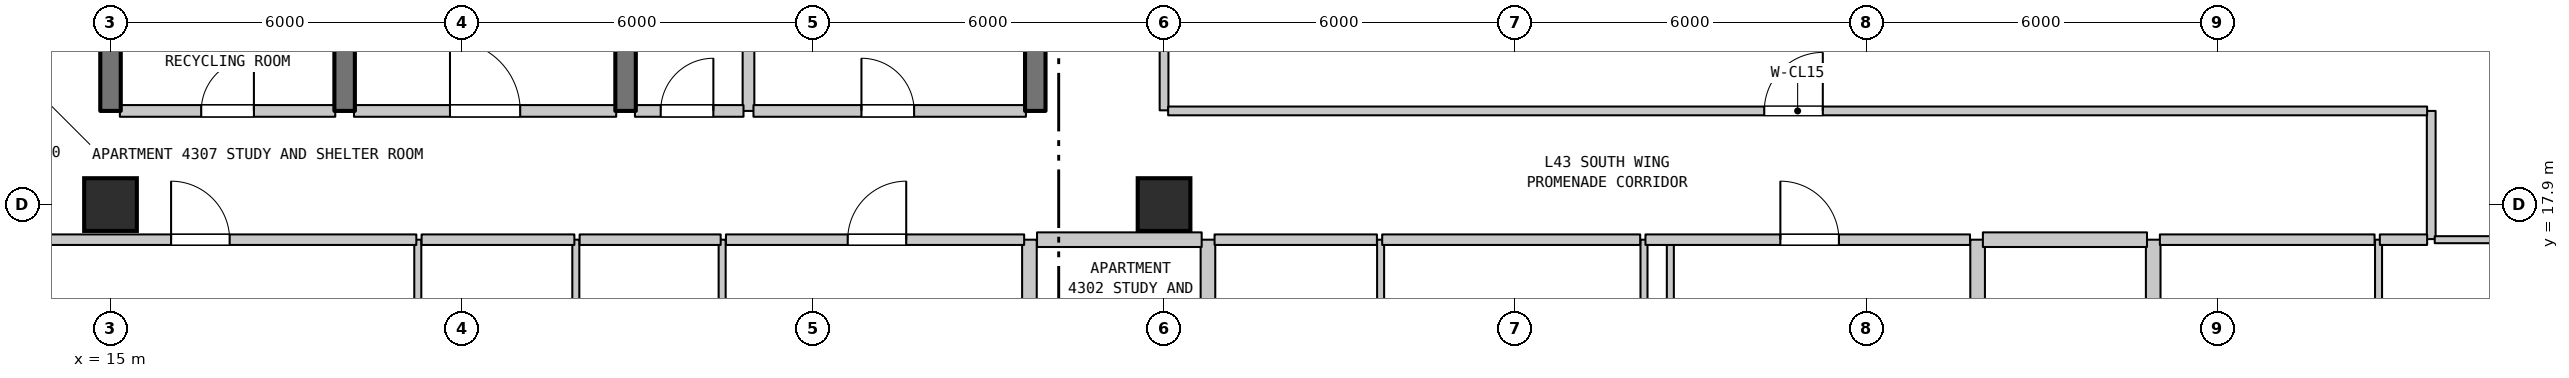
"""IFC4 building model, lengths in metres.
Left out: names, types, materials, properties, quantities, classifications, styles, units other than length and angle.
Written with IfcOpenShell. Run it as: python <this file> out.ifc"""

import sys

from ifc_helpers import new_model, si_unit, direction, frame, frame_2d, origin, origin_2d, place, context, subcontext, project, spatial, rectangle, extrude, element, fill, save


model = new_model("IFC4")
c1 = context("Model", 3, precision=1e-05, world=origin(), true_north=direction((0.0, 1.0)))
c2 = subcontext(c1, "Body", "Model", "MODEL_VIEW")
j1 = project(units=[si_unit("LENGTHUNIT", "METRE"), si_unit("PLANEANGLEUNIT", "RADIAN")], contexts=[c1])
p1 = place(None, origin())
s1 = spatial("IfcSite", under=j1, at=p1, CompositionType="ELEMENT")
p2 = place(p1, origin())
s2 = spatial("IfcBuilding", under=s1, at=p2, CompositionType="ELEMENT")
p3 = place(p2, frame((0.0, 0.0, 176.5)))
s3 = spatial("IfcBuildingStorey", under=s2, at=p3, CompositionType="ELEMENT", Elevation=176.5)
for number, where, z_axis, x_axis in (
    (1, (15.0, 17.9, 0.0), (0.0, 0.0, 1.0), (1.0, 0.0, 0.0)),
    (2, (33.0, 17.9, 0.0), (0.0, 0.0, 1.0), (1.0, 0.0, 0.0)),
):
    element("IfcColumn", number, at=place(p3, frame(where, z_axis=z_axis, x_axis=x_axis)), inside=s3, PredefinedType="COLUMN", context=c2, shape_type="SweptSolid", body=[
        extrude(rectangle(XDim=0.9, YDim=0.9, at=origin_2d()), origin(), (0.0, 0.0, 1.0), 3.7),
    ])
for number, where, z_axis, x_axis in (
    (3, (15.0, 19.5, 0.0), (0.0, 0.0, 1.0), (0.0, 1.0, 0.0)),
    (4, (19.0, 19.5, 0.0), (0.0, 0.0, 1.0), (0.0, 1.0, 0.0)),
):
    element("IfcWall", number, at=place(p3, frame(where, z_axis=z_axis, x_axis=x_axis)), inside=s3, PredefinedType="SHEAR", context=c2, shape_type="SweptSolid", body=[
        extrude(rectangle(XDim=3.2, YDim=0.35, at=frame_2d((1.6, 0.0))), origin(), (0.0, 0.0, 1.0), 3.39),
    ])
p4 = place(p3, frame((20.25, 14.1, 0.0), z_axis=(0.0, 0.0, 1.0), x_axis=(0.0, 1.0, 0.0)))
e5 = element("IfcWall", 5, at=p4, inside=s3, PredefinedType="PARTITIONING", context=c2, shape_type="SweptSolid", body=[
    extrude(rectangle(XDim=3.2, YDim=0.12, at=frame_2d((1.6, 0.0))), origin(), (0.0, 0.0, 1.0), 3.39),
])
p5 = place(p4, frame((1.15, 0.0, 0.0)))
e6 = element("IfcOpeningElement", 6, at=p5, cuts=e5, PredefinedType="OPENING", context=c2, shape_type="SweptSolid", body=[
    extrude(rectangle(XDim=0.9, YDim=2.15, at=frame_2d((0.45, 1.075))), frame((0.0, 0.07, 0.0), z_axis=(0.0, -1.0, 0.0), x_axis=(1.0, 0.0, 0.0)), (0.0, 0.0, 1.0), 0.14),
])
p6 = place(p3, frame((22.95, 14.1, 0.0), z_axis=(0.0, 0.0, 1.0), x_axis=(0.0, 1.0, 0.0)))
e7 = element("IfcWall", 7, at=p6, inside=s3, PredefinedType="PARTITIONING", context=c2, shape_type="SweptSolid", body=[
    extrude(rectangle(XDim=3.2, YDim=0.12, at=frame_2d((1.6, 0.0))), origin(), (0.0, 0.0, 1.0), 3.39),
])
p7 = place(p3, frame((23.8, 19.5, 0.0), z_axis=(0.0, 0.0, 1.0), x_axis=(0.0, 1.0, 0.0)))
e8 = element("IfcWall", 8, at=p7, inside=s3, PredefinedType="SHEAR", context=c2, shape_type="SweptSolid", body=[
    extrude(rectangle(XDim=3.2, YDim=0.35, at=frame_2d((1.6, 0.0))), origin(), (0.0, 0.0, 1.0), 3.39),
])
p8 = place(p3, frame((25.45, 14.85, 0.0), z_axis=(0.0, 0.0, 1.0), x_axis=(0.0, 1.0, 0.0)))
e9 = element("IfcWall", 9, at=p8, inside=s3, PredefinedType="PARTITIONING", context=c2, shape_type="SweptSolid", body=[
    extrude(rectangle(XDim=2.45, YDim=0.12, at=frame_2d((1.225, 0.0))), origin(), (0.0, 0.0, 1.0), 3.39),
])
p9 = place(p3, frame((25.9, 19.5, 0.0), z_axis=(0.0, 0.0, 1.0), x_axis=(0.0, 1.0, 0.0)))
e10 = element("IfcWall", 10, at=p9, inside=s3, PredefinedType="STANDARD", context=c2, shape_type="SweptSolid", body=[
    extrude(rectangle(XDim=3.2, YDim=0.2, at=frame_2d((1.6, 0.0))), origin(), (0.0, 0.0, 1.0), 3.39),
])
p10 = place(p3, frame((30.7, 11.15, 0.0), z_axis=(0.0, 0.0, 1.0), x_axis=(0.0, 1.0, 0.0)))
e11 = element("IfcWall", 11, at=p10, inside=s3, PredefinedType="STANDARD", context=c2, shape_type="SweptSolid", body=[
    extrude(rectangle(XDim=6.15, YDim=0.25, at=frame_2d((3.075, 0.0))), origin(), (0.0, 0.0, 1.0), 3.39),
])
p11 = place(p3, frame((30.8, 19.5, 0.0), z_axis=(0.0, 0.0, 1.0), x_axis=(0.0, 1.0, 0.0)))
e12 = element("IfcWall", 12, at=p11, inside=s3, PredefinedType="SHEAR", context=c2, shape_type="SweptSolid", body=[
    extrude(rectangle(XDim=3.2, YDim=0.35, at=frame_2d((1.6, 0.0))), origin(), (0.0, 0.0, 1.0), 3.39),
])
p12 = place(p3, frame((33.0, 19.51, 0.0), z_axis=(0.0, 0.0, 1.0), x_axis=(0.0, 1.0, 0.0)))
e13 = element("IfcWall", 13, at=p12, inside=s3, PredefinedType="STANDARD", context=c2, shape_type="SweptSolid", body=[
    extrude(rectangle(XDim=8.39, YDim=0.15, at=frame_2d((4.195, 0.0))), origin(), (0.0, 0.0, 1.0), 2.99),
])
p13 = place(p3, frame((33.75, 11.15, 0.0), z_axis=(0.0, 0.0, 1.0), x_axis=(0.0, 1.0, 0.0)))
e14 = element("IfcWall", 14, at=p13, inside=s3, PredefinedType="STANDARD", context=c2, shape_type="SweptSolid", body=[
    extrude(rectangle(XDim=6.15, YDim=0.25, at=frame_2d((3.075, 0.0))), origin(), (0.0, 0.0, 1.0), 3.39),
])
for number, where, z_axis, x_axis in (
    (15, (36.7, 11.15, 0.0), (0.0, 0.0, 1.0), (0.0, 1.0, 0.0)),
    (16, (41.2, 11.15, 0.0), (0.0, 0.0, 1.0), (0.0, 1.0, 0.0)),
):
    element("IfcWall", number, at=place(p3, frame(where, z_axis=z_axis, x_axis=x_axis)), inside=s3, PredefinedType="PARTITIONING", context=c2, shape_type="SweptSolid", body=[
        extrude(rectangle(XDim=6.15, YDim=0.12, at=frame_2d((3.075, 0.0))), origin(), (0.0, 0.0, 1.0), 3.39),
    ])
p14 = place(p3, frame((41.65, 14.85, 0.0), z_axis=(0.0, 0.0, 1.0), x_axis=(0.0, 1.0, 0.0)))
e17 = element("IfcWall", 17, at=p14, inside=s3, PredefinedType="PARTITIONING", context=c2, shape_type="SweptSolid", body=[
    extrude(rectangle(XDim=2.45, YDim=0.12, at=frame_2d((1.225, 0.0))), origin(), (0.0, 0.0, 1.0), 3.39),
])
for number, where, z_axis, x_axis in (
    (18, (46.9, 11.15, 0.0), (0.0, 0.0, 1.0), (0.0, 1.0, 0.0)),
    (19, (49.9, 11.15, 0.0), (0.0, 0.0, 1.0), (0.0, 1.0, 0.0)),
):
    element("IfcWall", number, at=place(p3, frame(where, z_axis=z_axis, x_axis=x_axis)), inside=s3, PredefinedType="STANDARD", context=c2, shape_type="SweptSolid", body=[
        extrude(rectangle(XDim=6.15, YDim=0.25, at=frame_2d((3.075, 0.0))), origin(), (0.0, 0.0, 1.0), 3.39),
    ])
p15 = place(p3, frame((53.75, 11.15, 0.0), z_axis=(0.0, 0.0, 1.0), x_axis=(0.0, 1.0, 0.0)))
e20 = element("IfcWall", 20, at=p15, inside=s3, PredefinedType="PARTITIONING", context=c2, shape_type="SweptSolid", body=[
    extrude(rectangle(XDim=6.15, YDim=0.12, at=frame_2d((3.075, 0.0))), origin(), (0.0, 0.0, 1.0), 3.39),
])
p16 = place(p3, frame((54.65, 17.31, 0.0), z_axis=(0.0, 0.0, 1.0), x_axis=(0.0, 1.0, 0.0)))
e21 = element("IfcWall", 21, at=p16, inside=s3, PredefinedType="STANDARD", context=c2, shape_type="SweptSolid", body=[
    extrude(rectangle(XDim=2.19, YDim=0.15, at=frame_2d((1.095, 0.0))), origin(), (0.0, 0.0, 1.0), 3.39),
])
p17 = place(p3, frame((12.875, 17.3, 0.0), z_axis=(0.0, 0.0, 1.0), x_axis=(1.0, 0.0, 0.0)))
e22 = element("IfcWall", 22, at=p17, inside=s3, PredefinedType="STANDARD", context=c2, shape_type="SweptSolid", body=[
    extrude(rectangle(XDim=7.35, YDim=0.18, at=frame_2d((3.675, 0.0))), origin(), (0.0, 0.0, 1.0), 3.39),
])
p18 = place(p17, frame((3.16, 0.0, 0.0)))
e23 = element("IfcOpeningElement", 23, at=p18, cuts=e22, PredefinedType="OPENING", context=c2, shape_type="SweptSolid", body=[
    extrude(rectangle(XDim=1.0, YDim=2.15, at=frame_2d((0.5, 1.075))), frame((0.0, 0.1, 0.0), z_axis=(0.0, -1.0, 0.0), x_axis=(1.0, 0.0, 0.0)), (0.0, 0.0, 1.0), 0.2),
])
p19 = place(p3, frame((20.315, 17.3, 0.0), z_axis=(0.0, 0.0, 1.0), x_axis=(1.0, 0.0, 0.0)))
e24 = element("IfcWall", 24, at=p19, inside=s3, PredefinedType="STANDARD", context=c2, shape_type="SweptSolid", body=[
    extrude(rectangle(XDim=2.61, YDim=0.18, at=frame_2d((1.305, 0.0))), origin(), (0.0, 0.0, 1.0), 3.39),
])
p20 = place(p3, frame((23.015, 17.3, 0.0), z_axis=(0.0, 0.0, 1.0), x_axis=(1.0, 0.0, 0.0)))
e25 = element("IfcWall", 25, at=p20, inside=s3, PredefinedType="STANDARD", context=c2, shape_type="SweptSolid", body=[
    extrude(rectangle(XDim=2.41, YDim=0.18, at=frame_2d((1.205, 0.0))), origin(), (0.0, 0.0, 1.0), 3.39),
])
p21 = place(p3, frame((25.515, 17.3, 0.0), z_axis=(0.0, 0.0, 1.0), x_axis=(1.0, 0.0, 0.0)))
e26 = element("IfcWall", 26, at=p21, inside=s3, PredefinedType="STANDARD", context=c2, shape_type="SweptSolid", body=[
    extrude(rectangle(XDim=5.095, YDim=0.18, at=frame_2d((2.548, 0.0))), origin(), (0.0, 0.0, 1.0), 3.39),
])
p22 = place(p21, frame((2.08, 0.0, 0.0)))
e27 = element("IfcOpeningElement", 27, at=p22, cuts=e26, PredefinedType="OPENING", context=c2, shape_type="SweptSolid", body=[
    extrude(rectangle(XDim=1.0, YDim=2.15, at=frame_2d((0.5, 1.075))), frame((0.0, 0.1, 0.0), z_axis=(0.0, -1.0, 0.0), x_axis=(1.0, 0.0, 0.0)), (0.0, 0.0, 1.0), 0.2),
])
p23 = place(p3, frame((30.83, 17.3, 0.0), z_axis=(0.0, 0.0, 1.0), x_axis=(1.0, 0.0, 0.0)))
e28 = element("IfcWall", 28, at=p23, inside=s3, PredefinedType="STANDARD", context=c2, shape_type="SweptSolid", body=[
    extrude(rectangle(XDim=2.813, YDim=0.25, at=frame_2d((1.406, 0.0))), origin(), (0.0, 0.0, 1.0), 3.39),
])
p24 = place(p3, frame((33.863, 17.3, 0.0), z_axis=(0.0, 0.0, 1.0), x_axis=(1.0, 0.0, 0.0)))
e29 = element("IfcWall", 29, at=p24, inside=s3, PredefinedType="STANDARD", context=c2, shape_type="SweptSolid", body=[
    extrude(rectangle(XDim=2.774, YDim=0.18, at=frame_2d((1.387, 0.0))), origin(), (0.0, 0.0, 1.0), 3.39),
])
p25 = place(p3, frame((36.727, 17.3, 0.0), z_axis=(0.0, 0.0, 1.0), x_axis=(1.0, 0.0, 0.0)))
e30 = element("IfcWall", 30, at=p25, inside=s3, PredefinedType="STANDARD", context=c2, shape_type="SweptSolid", body=[
    extrude(rectangle(XDim=4.408, YDim=0.18, at=frame_2d((2.204, 0.0))), origin(), (0.0, 0.0, 1.0), 3.39),
])
p26 = place(p3, frame((41.225, 17.3, 0.0), z_axis=(0.0, 0.0, 1.0), x_axis=(1.0, 0.0, 0.0)))
e31 = element("IfcWall", 31, at=p26, inside=s3, PredefinedType="STANDARD", context=c2, shape_type="SweptSolid", body=[
    extrude(rectangle(XDim=5.545, YDim=0.18, at=frame_2d((2.772, 0.0))), origin(), (0.0, 0.0, 1.0), 3.39),
])
p27 = place(p26, frame((2.305, 0.0, 0.0)))
e32 = element("IfcOpeningElement", 32, at=p27, cuts=e31, PredefinedType="OPENING", context=c2, shape_type="SweptSolid", body=[
    extrude(rectangle(XDim=1.0, YDim=2.15, at=frame_2d((0.5, 1.075))), frame((0.0, 0.1, 0.0), z_axis=(0.0, -1.0, 0.0), x_axis=(1.0, 0.0, 0.0)), (0.0, 0.0, 1.0), 0.2),
])
p28 = place(p3, frame((46.99, 17.3, 0.0), z_axis=(0.0, 0.0, 1.0), x_axis=(1.0, 0.0, 0.0)))
e33 = element("IfcWall", 33, at=p28, inside=s3, PredefinedType="STANDARD", context=c2, shape_type="SweptSolid", body=[
    extrude(rectangle(XDim=2.804, YDim=0.25, at=frame_2d((1.402, 0.0))), origin(), (0.0, 0.0, 1.0), 3.39),
])
p29 = place(p3, frame((50.014, 17.3, 0.0), z_axis=(0.0, 0.0, 1.0), x_axis=(1.0, 0.0, 0.0)))
e34 = element("IfcWall", 34, at=p29, inside=s3, PredefinedType="STANDARD", context=c2, shape_type="SweptSolid", body=[
    extrude(rectangle(XDim=3.668, YDim=0.18, at=frame_2d((1.834, 0.0))), origin(), (0.0, 0.0, 1.0), 3.39),
])
p30 = place(p3, frame((53.772, 17.3, 0.0), z_axis=(0.0, 0.0, 1.0), x_axis=(1.0, 0.0, 0.0)))
e35 = element("IfcWall", 35, at=p30, inside=s3, PredefinedType="STANDARD", context=c2, shape_type="SweptSolid", body=[
    extrude(rectangle(XDim=0.808, YDim=0.18, at=frame_2d((0.404, 0.0))), origin(), (0.0, 0.0, 1.0), 3.39),
])
p31 = place(p3, frame((54.71, 17.3, 0.0), z_axis=(0.0, 0.0, 1.0), x_axis=(1.0, 0.0, 0.0)))
e36 = element("IfcWall", 36, at=p31, inside=s3, PredefinedType="PARTITIONING", context=c2, shape_type="SweptSolid", body=[
    extrude(rectangle(XDim=1.635, YDim=0.12, at=frame_2d((0.817, 0.0))), origin(), (0.0, 0.0, 1.0), 3.39),
])
p32 = place(p3, frame((15.16, 19.5, 0.0), z_axis=(0.0, 0.0, 1.0), x_axis=(1.0, 0.0, 0.0)))
e37 = element("IfcWall", 37, at=p32, inside=s3, PredefinedType="STANDARD", context=c2, shape_type="SweptSolid", body=[
    extrude(rectangle(XDim=3.68, YDim=0.2, at=frame_2d((1.84, 0.0))), origin(), (0.0, 0.0, 1.0), 3.39),
])
p33 = place(p32, frame((1.39, 0.0, 0.0)))
e38 = element("IfcOpeningElement", 38, at=p33, cuts=e37, PredefinedType="OPENING", context=c2, shape_type="SweptSolid", body=[
    extrude(rectangle(XDim=0.9, YDim=2.15, at=frame_2d((0.45, 1.075))), frame((0.0, 0.11, 0.0), z_axis=(0.0, -1.0, 0.0), x_axis=(1.0, 0.0, 0.0)), (0.0, 0.0, 1.0), 0.22),
])
p34 = place(p3, frame((19.16, 19.5, 0.0), z_axis=(0.0, 0.0, 1.0), x_axis=(1.0, 0.0, 0.0)))
e39 = element("IfcWall", 39, at=p34, inside=s3, PredefinedType="STANDARD", context=c2, shape_type="SweptSolid", body=[
    extrude(rectangle(XDim=4.48, YDim=0.2, at=frame_2d((2.24, 0.0))), origin(), (0.0, 0.0, 1.0), 3.39),
])
p35 = place(p34, frame((1.64, 0.0, 0.0)))
e40 = element("IfcOpeningElement", 40, at=p35, cuts=e39, PredefinedType="OPENING", context=c2, shape_type="SweptSolid", body=[
    extrude(rectangle(XDim=1.2, YDim=2.2, at=frame_2d((0.6, 1.1))), frame((0.0, 0.11, 0.0), z_axis=(0.0, -1.0, 0.0), x_axis=(1.0, 0.0, 0.0)), (0.0, 0.0, 1.0), 0.22),
])
p36 = place(p3, frame((23.96, 19.5, 0.0), z_axis=(0.0, 0.0, 1.0), x_axis=(1.0, 0.0, 0.0)))
e41 = element("IfcWall", 41, at=p36, inside=s3, PredefinedType="STANDARD", context=c2, shape_type="SweptSolid", body=[
    extrude(rectangle(XDim=1.855, YDim=0.2, at=frame_2d((0.927, 0.0))), origin(), (0.0, 0.0, 1.0), 3.39),
])
p37 = place(p36, frame((0.44, 0.0, 0.0)))
e42 = element("IfcOpeningElement", 42, at=p37, cuts=e41, PredefinedType="OPENING", context=c2, shape_type="SweptSolid", body=[
    extrude(rectangle(XDim=0.9, YDim=2.15, at=frame_2d((0.45, 1.075))), frame((0.0, 0.11, 0.0), z_axis=(0.0, -1.0, 0.0), x_axis=(1.0, 0.0, 0.0)), (0.0, 0.0, 1.0), 0.22),
])
p38 = place(p3, frame((25.985, 19.5, 0.0), z_axis=(0.0, 0.0, 1.0), x_axis=(1.0, 0.0, 0.0)))
e43 = element("IfcWall", 43, at=p38, inside=s3, PredefinedType="STANDARD", context=c2, shape_type="SweptSolid", body=[
    extrude(rectangle(XDim=4.655, YDim=0.2, at=frame_2d((2.327, 0.0))), origin(), (0.0, 0.0, 1.0), 3.39),
])
p39 = place(p38, frame((1.845, 0.0, 0.0)))
e44 = element("IfcOpeningElement", 44, at=p39, cuts=e43, PredefinedType="OPENING", context=c2, shape_type="SweptSolid", body=[
    extrude(rectangle(XDim=0.9, YDim=2.15, at=frame_2d((0.45, 1.075))), frame((0.0, 0.11, 0.0), z_axis=(0.0, -1.0, 0.0), x_axis=(1.0, 0.0, 0.0)), (0.0, 0.0, 1.0), 0.22),
])
p40 = place(p3, frame((33.07, 19.5, 0.0), z_axis=(0.0, 0.0, 1.0), x_axis=(1.0, 0.0, 0.0)))
e45 = element("IfcWall", 45, at=p40, inside=s3, PredefinedType="STANDARD", context=c2, shape_type="SweptSolid", body=[
    extrude(rectangle(XDim=21.51, YDim=0.15, at=frame_2d((10.755, 0.0))), origin(), (0.0, 0.0, 1.0), 3.39),
])
p41 = place(p40, frame((10.185, 0.0, 0.0)))
e46 = element("IfcOpeningElement", 46, at=p41, cuts=e45, PredefinedType="OPENING", context=c2, shape_type="SweptSolid", body=[
    extrude(rectangle(XDim=1.0, YDim=2.15, at=frame_2d((0.5, 1.075))), frame((0.0, 0.085, 0.0), z_axis=(0.0, -1.0, 0.0), x_axis=(1.0, 0.0, 0.0)), (0.0, 0.0, 1.0), 0.17),
])
p42 = place(p18, origin())
e47 = element("IfcDoor", 47, at=p42, inside=s3, OperationType="SINGLE_SWING_LEFT", PredefinedType="DOOR", context=c2, shape_type="SweptSolid", body=[
    extrude(rectangle(XDim=1.0, YDim=2.15, at=frame_2d((0.5, 1.075))), frame((0.0, 0.025, 0.0), z_axis=(0.0, -1.0, 0.0), x_axis=(1.0, 0.0, 0.0)), (0.0, 0.0, 1.0), 0.05),
])
fill(e23, e47)
p43 = place(p22, origin())
e48 = element("IfcDoor", 48, at=p43, inside=s3, OperationType="SINGLE_SWING_RIGHT", PredefinedType="DOOR", context=c2, shape_type="SweptSolid", body=[
    extrude(rectangle(XDim=1.0, YDim=2.15, at=frame_2d((0.5, 1.075))), frame((0.0, 0.025, 0.0), z_axis=(0.0, -1.0, 0.0), x_axis=(1.0, 0.0, 0.0)), (0.0, 0.0, 1.0), 0.05),
])
fill(e27, e48)
p44 = place(p27, origin())
e49 = element("IfcDoor", 49, at=p44, inside=s3, OperationType="SINGLE_SWING_LEFT", PredefinedType="DOOR", context=c2, shape_type="SweptSolid", body=[
    extrude(rectangle(XDim=1.0, YDim=2.15, at=frame_2d((0.5, 1.075))), frame((0.0, 0.025, 0.0), z_axis=(0.0, -1.0, 0.0), x_axis=(1.0, 0.0, 0.0)), (0.0, 0.0, 1.0), 0.05),
])
fill(e32, e49)
p45 = place(p33, origin())
e50 = element("IfcDoor", 50, at=p45, inside=s3, OperationType="SINGLE_SWING_RIGHT", PredefinedType="DOOR", context=c2, shape_type="SweptSolid", body=[
    extrude(rectangle(XDim=0.9, YDim=2.15, at=frame_2d((0.45, 1.075))), frame((0.0, 0.025, 0.0), z_axis=(0.0, -1.0, 0.0), x_axis=(1.0, 0.0, 0.0)), (0.0, 0.0, 1.0), 0.05),
])
fill(e38, e50)
p46 = place(p35, origin())
e51 = element("IfcDoor", 51, at=p46, inside=s3, OperationType="SINGLE_SWING_LEFT", PredefinedType="DOOR", context=c2, shape_type="SweptSolid", body=[
    extrude(rectangle(XDim=1.2, YDim=2.2, at=frame_2d((0.6, 1.1))), frame((0.0, 0.025, 0.0), z_axis=(0.0, -1.0, 0.0), x_axis=(1.0, 0.0, 0.0)), (0.0, 0.0, 1.0), 0.05),
])
fill(e40, e51)
p47 = place(p37, origin())
e52 = element("IfcDoor", 52, at=p47, inside=s3, OperationType="SINGLE_SWING_RIGHT", PredefinedType="DOOR", context=c2, shape_type="SweptSolid", body=[
    extrude(rectangle(XDim=0.9, YDim=2.15, at=frame_2d((0.45, 1.075))), frame((0.0, 0.025, 0.0), z_axis=(0.0, -1.0, 0.0), x_axis=(1.0, 0.0, 0.0)), (0.0, 0.0, 1.0), 0.05),
])
fill(e42, e52)
p48 = place(p39, origin())
e53 = element("IfcDoor", 53, at=p48, inside=s3, OperationType="SINGLE_SWING_LEFT", PredefinedType="DOOR", context=c2, shape_type="SweptSolid", body=[
    extrude(rectangle(XDim=0.9, YDim=2.15, at=frame_2d((0.45, 1.075))), frame((0.0, 0.025, 0.0), z_axis=(0.0, -1.0, 0.0), x_axis=(1.0, 0.0, 0.0)), (0.0, 0.0, 1.0), 0.05),
])
fill(e44, e53)
p49 = place(p41, origin())
e54 = element("IfcDoor", 54, at=p49, inside=s3, OperationType="SINGLE_SWING_RIGHT", PredefinedType="DOOR", context=c2, shape_type="SweptSolid", body=[
    extrude(rectangle(XDim=1.0, YDim=2.15, at=frame_2d((0.5, 1.075))), frame((0.0, 0.025, 0.0), z_axis=(0.0, -1.0, 0.0), x_axis=(1.0, 0.0, 0.0)), (0.0, 0.0, 1.0), 0.05),
])
fill(e46, e54)
save(model, sys.argv[1])
